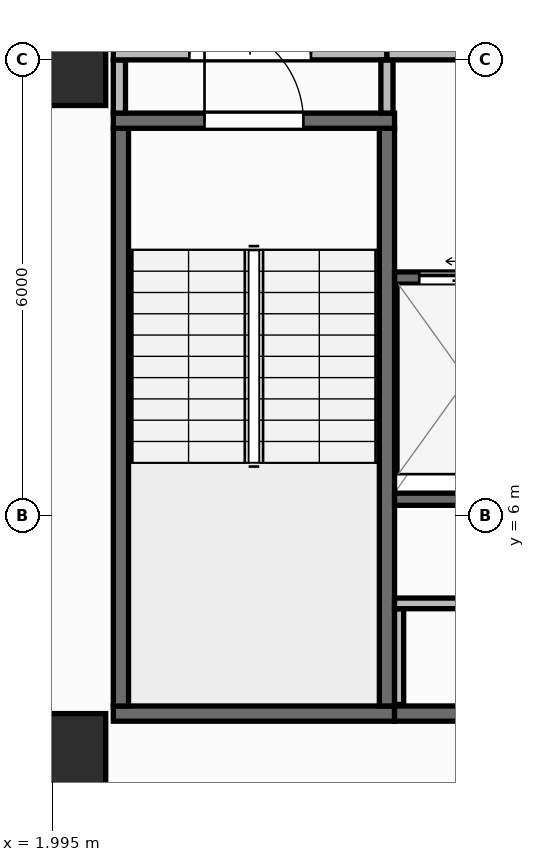
"""IFC4 building model, lengths in metres.
Left out: names, types, materials, properties, quantities, classifications, styles, units other than length and angle.
Written with IfcOpenShell. Run it as: python <this file> out.ifc"""

import sys

from ifc_helpers import new_model, si_unit, direction, frame, frame_2d, origin, origin_2d, place, context, subcontext, project, spatial, rectangle, extrude, element, fill, save


model = new_model("IFC4")
c1 = context("Model", 3, precision=1e-05, world=origin(), true_north=direction((0.0, 1.0)))
c2 = subcontext(c1, "Body", "Model", "MODEL_VIEW")
j1 = project(units=[si_unit("LENGTHUNIT", "METRE"), si_unit("PLANEANGLEUNIT", "RADIAN")], contexts=[c1])
p1 = place(None, origin())
s1 = spatial("IfcSite", under=j1, at=p1, CompositionType="ELEMENT")
p2 = place(p1, origin())
s2 = spatial("IfcBuilding", under=s1, at=p2, CompositionType="ELEMENT")
p3 = place(p2, frame((0.0, 0.0, 138.9)))
s3 = spatial("IfcBuildingStorey", under=s2, at=p3, CompositionType="ELEMENT", Elevation=138.9)
for number, where, z_axis, x_axis in (
    (1, (2.1, 2.8, 0.0), (0.0, 0.0, 1.0), (1.0, 0.0, 0.0)),
    (2, (2.1, 12.0, 0.0), (0.0, 0.0, 1.0), (1.0, 0.0, 0.0)),
):
    element("IfcColumn", number, at=place(p3, frame(where, z_axis=z_axis, x_axis=x_axis)), inside=s3, PredefinedType="COLUMN", context=c2, shape_type="SweptSolid", body=[
        extrude(rectangle(XDim=1.2, YDim=1.2, at=origin_2d()), origin(), (0.0, 0.0, 1.0), 3.95),
    ])
p4 = place(p3, frame((2.76, 0.173, 0.0), z_axis=(0.0, 0.0, 1.0), x_axis=(0.996857931723, 0.079210251617, 0.0)))
e3 = element("IfcWall", 3, at=p4, inside=s3, PredefinedType="STANDARD", context=c2, shape_type="SweptSolid", body=[
    extrude(rectangle(XDim=51.442, YDim=0.26, at=frame_2d((25.721, 0.0))), origin(), (0.0, 0.0, 1.0), 3.71),
])
p5 = place(p4, frame((24.521, 0.0, 0.9)))
e4 = element("IfcOpeningElement", 4, at=p5, cuts=e3, PredefinedType="OPENING", context=c2, shape_type="SweptSolid", body=[
    extrude(rectangle(XDim=2.4, YDim=1.65, at=frame_2d((1.2, 0.825))), frame((0.0, 0.14, 0.0), z_axis=(0.0, -1.0, 0.0), x_axis=(1.0, 0.0, 0.0)), (0.0, 0.0, 1.0), 0.28),
])
p6 = place(p3, frame((2.8, 3.4, 0.0), z_axis=(0.0, 0.0, 1.0), x_axis=(1.0, 0.0, 0.0)))
e5 = element("IfcWall", 5, at=p6, inside=s3, PredefinedType="SHEAR", context=c2, shape_type="SweptSolid", body=[
    extrude(rectangle(XDim=3.7, YDim=0.2, at=frame_2d((1.85, 0.0))), origin(), (0.0, 0.0, 1.0), 3.71),
])
for number, where, z_axis, x_axis in (
    (6, (2.9, 3.5, 0.0), (0.0, 0.0, 1.0), (0.0, 1.0, 0.0)),
    (7, (6.4, 3.5, 0.0), (0.0, 0.0, 1.0), (0.0, 1.0, 0.0)),
):
    element("IfcWall", number, at=place(p3, frame(where, z_axis=z_axis, x_axis=x_axis)), inside=s3, PredefinedType="SHEAR", context=c2, shape_type="SweptSolid", body=[
        extrude(rectangle(XDim=7.6, YDim=0.2, at=frame_2d((3.8, 0.0))), origin(), (0.0, 0.0, 1.0), 3.71),
    ])
p7 = place(p3, frame((2.8, 11.2, 0.0), z_axis=(0.0, 0.0, 1.0), x_axis=(1.0, 0.0, 0.0)))
e8 = element("IfcWall", 8, at=p7, inside=s3, PredefinedType="SHEAR", context=c2, shape_type="SweptSolid", body=[
    extrude(rectangle(XDim=3.7, YDim=0.2, at=frame_2d((1.85, 0.0))), origin(), (0.0, 0.0, 1.0), 3.71),
])
p8 = place(p7, frame((1.2, 0.0, 0.0)))
e9 = element("IfcOpeningElement", 9, at=p8, cuts=e8, PredefinedType="OPENING", context=c2, shape_type="SweptSolid", body=[
    extrude(rectangle(XDim=1.3, YDim=2.15, at=frame_2d((0.65, 1.075))), frame((0.0, 0.11, 0.0), z_axis=(0.0, -1.0, 0.0), x_axis=(1.0, 0.0, 0.0)), (0.0, 0.0, 1.0), 0.22),
])
p9 = place(p3, frame((6.5, 3.4, 0.0), z_axis=(0.0, 0.0, 1.0), x_axis=(1.0, 0.0, 0.0)))
e10 = element("IfcWall", 10, at=p9, inside=s3, PredefinedType="SHEAR", context=c2, shape_type="SweptSolid", body=[
    extrude(rectangle(XDim=13.7, YDim=0.2, at=frame_2d((6.85, 0.0))), origin(), (0.0, 0.0, 1.0), 3.71),
])
p10 = place(p3, frame((6.5, 6.22, 0.0), z_axis=(0.0, 0.0, 1.0), x_axis=(1.0, 0.0, 0.0)))
e11 = element("IfcWall", 11, at=p10, inside=s3, PredefinedType="SHEAR", context=c2, shape_type="SweptSolid", body=[
    extrude(rectangle(XDim=12.11, YDim=0.16, at=frame_2d((6.055, 0.0))), origin(), (0.0, 0.0, 1.0), 3.71),
])
p11 = place(p3, frame((6.5, 9.13, 0.0), z_axis=(0.0, 0.0, 1.0), x_axis=(1.0, 0.0, 0.0)))
e12 = element("IfcWall", 12, at=p11, inside=s3, PredefinedType="SHEAR", context=c2, shape_type="SweptSolid", body=[
    extrude(rectangle(XDim=1.975, YDim=0.16, at=frame_2d((0.988, 0.0))), origin(), (0.0, 0.0, 1.0), 3.71),
])
p12 = place(p11, frame((0.325, 0.0, 0.0)))
e13 = element("IfcOpeningElement", 13, at=p12, cuts=e12, PredefinedType="OPENING", context=c2, shape_type="SweptSolid", body=[
    extrude(rectangle(XDim=1.25, YDim=2.15, at=frame_2d((0.625, 1.075))), frame((0.0, 0.09, 0.0), z_axis=(0.0, -1.0, 0.0), x_axis=(1.0, 0.0, 0.0)), (0.0, 0.0, 1.0), 0.18),
])
p13 = place(p3, frame((6.56, 3.52, 0.0), z_axis=(0.0, 0.0, 1.0), x_axis=(0.0, 1.0, 0.0)))
e14 = element("IfcWall", 14, at=p13, inside=s3, PredefinedType="PARTITIONING", context=c2, shape_type="SweptSolid", body=[
    extrude(rectangle(XDim=1.26, YDim=0.12, at=frame_2d((0.63, 0.0))), origin(), (0.0, 0.0, 1.0), 3.71),
])
p14 = place(p3, frame((6.5, 4.85, 0.0), z_axis=(0.0, 0.0, 1.0), x_axis=(1.0, 0.0, 0.0)))
e15 = element("IfcWall", 15, at=p14, inside=s3, PredefinedType="PARTITIONING", context=c2, shape_type="SweptSolid", body=[
    extrude(rectangle(XDim=5.67, YDim=0.14, at=frame_2d((2.835, 0.0))), origin(), (0.0, 0.0, 1.0), 3.71),
])
p15 = place(p14, frame((2.285, 0.0, 0.0)))
e16 = element("IfcOpeningElement", 16, at=p15, cuts=e15, PredefinedType="OPENING", context=c2, shape_type="SweptSolid", body=[
    extrude(rectangle(XDim=1.1, YDim=2.1, at=frame_2d((0.55, 1.05))), frame((0.0, 0.08, 0.0), z_axis=(0.0, -1.0, 0.0), x_axis=(1.0, 0.0, 0.0)), (0.0, 0.0, 1.0), 0.16),
])
p16 = place(p3, frame((2.88, 11.3, 0.0), z_axis=(0.0, 0.0, 1.0), x_axis=(0.0, 1.0, 0.0)))
e17 = element("IfcWall", 17, at=p16, inside=s3, PredefinedType="PARTITIONING", context=c2, shape_type="SweptSolid", body=[
    extrude(rectangle(XDim=0.7, YDim=0.16, at=frame_2d((0.35, 0.0))), origin(), (0.0, 0.0, 1.0), 3.71),
])
p17 = place(p3, frame((2.8, 12.08, 0.0), z_axis=(0.0, 0.0, 1.0), x_axis=(1.0, 0.0, 0.0)))
e18 = element("IfcWall", 18, at=p17, inside=s3, PredefinedType="PARTITIONING", context=c2, shape_type="SweptSolid", body=[
    extrude(rectangle(XDim=3.6, YDim=0.16, at=frame_2d((1.8, 0.0))), origin(), (0.0, 0.0, 1.0), 3.083),
])
p18 = place(p17, frame((1.0, 0.0, 0.0)))
e19 = element("IfcOpeningElement", 19, at=p18, cuts=e18, PredefinedType="OPENING", context=c2, shape_type="SweptSolid", body=[
    extrude(rectangle(XDim=1.6, YDim=2.05, at=frame_2d((0.8, 1.025))), frame((0.0, 0.09, 0.0), z_axis=(0.0, -1.0, 0.0), x_axis=(1.0, 0.0, 0.0)), (0.0, 0.0, 1.0), 0.18),
])
p19 = place(p3, frame((6.4, 11.3, 0.0), z_axis=(0.0, 0.0, 1.0), x_axis=(0.0, 1.0, 0.0)))
e20 = element("IfcWall", 20, at=p19, inside=s3, PredefinedType="PARTITIONING", context=c2, shape_type="SweptSolid", body=[
    extrude(rectangle(XDim=0.7, YDim=0.16, at=frame_2d((0.35, 0.0))), origin(), (0.0, 0.0, 1.0), 3.71),
])
p20 = place(p3, frame((6.4, 12.08, 0.0), z_axis=(0.0, 0.0, 1.0), x_axis=(1.0, 0.0, 0.0)))
e21 = element("IfcWall", 21, at=p20, inside=s3, PredefinedType="PARTITIONING", context=c2, shape_type="SweptSolid", body=[
    extrude(rectangle(XDim=6.18, YDim=0.16, at=frame_2d((3.09, 0.0))), origin(), (0.0, 0.0, 1.0), 3.083),
])
p21 = place(p20, frame((2.29, 0.0, 0.0)))
e22 = element("IfcOpeningElement", 22, at=p21, cuts=e21, PredefinedType="OPENING", context=c2, shape_type="SweptSolid", body=[
    extrude(rectangle(XDim=1.6, YDim=2.05, at=frame_2d((0.8, 1.025))), frame((0.0, 0.09, 0.0), z_axis=(0.0, -1.0, 0.0), x_axis=(1.0, 0.0, 0.0)), (0.0, 0.0, 1.0), 0.18),
])
p22 = place(p8, origin())
e23 = element("IfcDoor", 23, at=p22, inside=s3, OperationType="SINGLE_SWING_LEFT", PredefinedType="DOOR", context=c2, shape_type="SweptSolid", body=[
    extrude(rectangle(XDim=1.3, YDim=2.15, at=frame_2d((0.65, 1.075))), frame((0.0, 0.025, 0.0), z_axis=(0.0, -1.0, 0.0), x_axis=(1.0, 0.0, 0.0)), (0.0, 0.0, 1.0), 0.05),
])
fill(e9, e23)
p23 = place(p12, origin())
e24 = element("IfcDoor", 24, at=p23, inside=s3, OperationType="SLIDING_TO_LEFT", PredefinedType="DOOR", context=c2, shape_type="SweptSolid", body=[
    extrude(rectangle(XDim=1.25, YDim=2.15, at=frame_2d((0.625, 1.075))), frame((0.0, 0.025, 0.0), z_axis=(0.0, -1.0, 0.0), x_axis=(1.0, 0.0, 0.0)), (0.0, 0.0, 1.0), 0.05),
])
fill(e13, e24)
p24 = place(p18, origin())
e25 = element("IfcDoor", 25, at=p24, inside=s3, OperationType="DOUBLE_DOOR_SINGLE_SWING", PredefinedType="DOOR", context=c2, shape_type="SweptSolid", body=[
    extrude(rectangle(XDim=1.6, YDim=2.05, at=frame_2d((0.8, 1.025))), frame((0.0, 0.025, 0.0), z_axis=(0.0, -1.0, 0.0), x_axis=(1.0, 0.0, 0.0)), (0.0, 0.0, 1.0), 0.05),
])
fill(e19, e25)
save(model, sys.argv[1])
